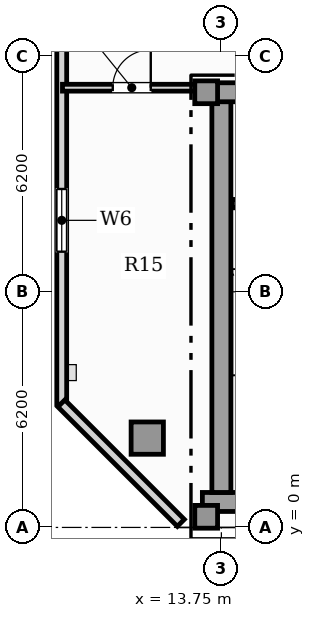
"""IFC4 building model, lengths in metres.
Left out: names, types, materials, properties, quantities, classifications, styles, units other than length and angle.
Written with IfcOpenShell. Run it as: python <this file> out.ifc"""

import sys

from ifc_helpers import new_model, si_unit, direction, frame, frame_2d, origin, origin_2d, place, context, subcontext, project, spatial, rectangle, hollow_rectangle, extrude, element, fill, save


model = new_model("IFC4")
c1 = context("Model", 3, precision=1e-05, world=origin(), true_north=direction((0.0, 1.0)))
c2 = subcontext(c1, "Body", "Model", "MODEL_VIEW")
j1 = project(units=[si_unit("LENGTHUNIT", "METRE"), si_unit("PLANEANGLEUNIT", "RADIAN")], contexts=[c1])
p1 = place(None, origin())
s1 = spatial("IfcSite", under=j1, at=p1, CompositionType="ELEMENT")
p2 = place(p1, origin())
s2 = spatial("IfcBuilding", under=s1, at=p2, CompositionType="ELEMENT")
p3 = place(p2, frame((0.0, 0.0, 341.35)))
s3 = spatial("IfcBuildingStorey", under=s2, at=p3, CompositionType="ELEMENT", Elevation=341.35)
p4 = place(p3, frame((13.25, 0.67, 0.0), z_axis=(0.0, 0.0, 1.0), x_axis=(1.0, 0.0, 0.0)))
e1 = element("IfcWall", 1, at=p4, inside=s3, PredefinedType="SHEAR", context=c2, shape_type="SweptSolid", body=[
    extrude(rectangle(XDim=31.0, YDim=0.5, at=frame_2d((15.5, 0.0))), origin(), (0.0, 0.0, 1.0), 3.63),
])
p5 = place(p3, frame((13.75, 0.92, 0.0), z_axis=(0.0, 0.0, 1.0), x_axis=(0.0, 1.0, 0.0)))
e2 = element("IfcWall", 2, at=p5, inside=s3, PredefinedType="SHEAR", context=c2, shape_type="SweptSolid", body=[
    extrude(rectangle(XDim=10.53, YDim=0.5, at=frame_2d((5.265, 0.0))), origin(), (0.0, 0.0, 1.0), 3.63),
])
p6 = place(p3, frame((13.25, 11.45, 0.0), z_axis=(0.0, 0.0, 1.0), x_axis=(1.0, 0.0, 0.0)))
e3 = element("IfcWall", 3, at=p6, inside=s3, PredefinedType="SHEAR", context=c2, shape_type="SweptSolid", body=[
    extrude(rectangle(XDim=2.95, YDim=0.5, at=frame_2d((1.475, 0.0))), origin(), (0.0, 0.0, 1.0), 3.63),
])
for number, where, z_axis, x_axis in (
    (4, (13.35, 0.28, 0.0), (0.0, 0.0, 1.0), (1.0, 0.0, 0.0)),
    (5, (13.35, 11.45, 0.0), (0.0, 0.0, 1.0), (1.0, 0.0, 0.0)),
):
    element("IfcColumn", number, at=place(p3, frame(where, z_axis=z_axis, x_axis=x_axis)), inside=s3, PredefinedType="COLUMN", context=c2, shape_type="SweptSolid", body=[
        extrude(rectangle(XDim=0.6, YDim=0.6, at=origin_2d()), origin(), (0.0, 0.0, 1.0), 3.85),
    ])
p7 = place(p3, frame((11.8, 2.35, 0.0), z_axis=(0.0, 0.0, 1.0), x_axis=(1.0, 0.0, 0.0)))
e6 = element("IfcColumn", 6, at=p7, inside=s3, PredefinedType="USERDEFINED", context=c2, shape_type="SweptSolid", body=[
    extrude(hollow_rectangle(XDim=0.85, YDim=0.85, WallThickness=0.05, at=origin_2d()), origin(), (0.0, 0.0, 1.0), 3.85),
])
p8 = place(p3, frame((9.55, 28.408, 0.0), z_axis=(0.0, 0.0, 1.0), x_axis=(0.0, -1.0, 0.0)))
e7 = element("IfcWall", 7, at=p8, inside=s3, PredefinedType="SOLIDWALL", context=c2, shape_type="SweptSolid", body=[
    extrude(rectangle(XDim=25.168, YDim=0.26, at=frame_2d((12.584, 0.0))), origin(), (0.0, 0.0, 1.0), 3.63),
])
p9 = place(p8, frame((19.503, 0.0, 0.88)))
e8 = element("IfcOpeningElement", 8, at=p9, cuts=e7, PredefinedType="OPENING", context=c2, shape_type="SweptSolid", body=[
    extrude(rectangle(XDim=1.65, YDim=2.0, at=frame_2d((0.825, 1.0))), frame((0.0, 0.14, 0.0), z_axis=(0.0, -1.0, 0.0), x_axis=(1.0, 0.0, 0.0)), (0.0, 0.0, 1.0), 0.28),
])
p10 = place(p8, frame((2.77, 0.0, 0.95)))
e9 = element("IfcOpeningElement", 9, at=p10, cuts=e7, PredefinedType="OPENING", context=c2, shape_type="SweptSolid", body=[
    extrude(rectangle(XDim=0.9, YDim=1.5, at=frame_2d((0.45, 0.75))), frame((0.0, 0.14, 0.0), z_axis=(0.0, -1.0, 0.0), x_axis=(1.0, 0.0, 0.0)), (0.0, 0.0, 1.0), 0.28),
])
p11 = place(p8, frame((11.274, 0.0, 0.88)))
e10 = element("IfcOpeningElement", 10, at=p11, cuts=e7, PredefinedType="OPENING", context=c2, shape_type="SweptSolid", body=[
    extrude(rectangle(XDim=1.65, YDim=2.0, at=frame_2d((0.825, 1.0))), frame((0.0, 0.14, 0.0), z_axis=(0.0, -1.0, 0.0), x_axis=(1.0, 0.0, 0.0)), (0.0, 0.0, 1.0), 0.28),
])
p12 = place(p8, frame((8.044, 0.0, 0.88)))
e11 = element("IfcOpeningElement", 11, at=p12, cuts=e7, PredefinedType="OPENING", context=c2, shape_type="SweptSolid", body=[
    extrude(rectangle(XDim=1.65, YDim=2.0, at=frame_2d((0.825, 1.0))), frame((0.0, 0.14, 0.0), z_axis=(0.0, -1.0, 0.0), x_axis=(1.0, 0.0, 0.0)), (0.0, 0.0, 1.0), 0.28),
])
p13 = place(p8, frame((4.815, 0.0, 0.88)))
e12 = element("IfcOpeningElement", 12, at=p13, cuts=e7, PredefinedType="OPENING", context=c2, shape_type="SweptSolid", body=[
    extrude(rectangle(XDim=1.65, YDim=2.0, at=frame_2d((0.825, 1.0))), frame((0.0, 0.14, 0.0), z_axis=(0.0, -1.0, 0.0), x_axis=(1.0, 0.0, 0.0)), (0.0, 0.0, 1.0), 0.28),
])
p14 = place(p3, frame((9.54, 3.264, 0.0), z_axis=(0.0, 0.0, 1.0), x_axis=(0.707079321262, -0.707134240044, 0.0)))
e13 = element("IfcWall", 13, at=p14, inside=s3, PredefinedType="SOLIDWALL", context=c2, shape_type="SweptSolid", body=[
    extrude(rectangle(XDim=4.446, YDim=0.26, at=frame_2d((2.223, 0.0))), origin(), (0.0, 0.0, 1.0), 3.63),
])
p15 = place(p3, frame((14.04, 8.52, 0.0), z_axis=(0.0, 0.0, 1.0), x_axis=(1.0, 0.0, 0.0)))
e14 = element("IfcWall", 14, at=p15, inside=s3, PredefinedType="SOLIDWALL", context=c2, shape_type="SweptSolid", body=[
    extrude(rectangle(XDim=3.4, YDim=0.22, at=frame_2d((1.7, 0.0))), origin(), (0.0, 0.0, 1.0), 3.63),
])
p16 = place(p15, frame((1.125, 0.0, 0.0)))
e15 = element("IfcOpeningElement", 15, at=p16, cuts=e14, PredefinedType="OPENING", context=c2, shape_type="SweptSolid", body=[
    extrude(rectangle(XDim=1.15, YDim=2.2, at=frame_2d((0.575, 1.1))), frame((0.0, 0.12, 0.0), z_axis=(0.0, -1.0, 0.0), x_axis=(1.0, 0.0, 0.0)), (0.0, 0.0, 1.0), 0.24),
])
p17 = place(p3, frame((9.569, 11.57, 0.0), z_axis=(0.0, 0.0, 1.0), x_axis=(1.0, 0.0, 0.0)))
e16 = element("IfcWall", 16, at=p17, inside=s3, PredefinedType="PARTITIONING", context=c2, shape_type="SweptSolid", body=[
    extrude(rectangle(XDim=3.646, YDim=0.18, at=frame_2d((1.823, 0.0))), origin(), (0.0, 0.0, 1.0), 3.63),
])
p18 = place(p17, frame((1.323, 0.0, 0.0)))
e17 = element("IfcOpeningElement", 17, at=p18, cuts=e16, PredefinedType="OPENING", context=c2, shape_type="SweptSolid", body=[
    extrude(rectangle(XDim=1.0, YDim=2.15, at=frame_2d((0.5, 1.075))), frame((0.0, 0.1, 0.0), z_axis=(0.0, -1.0, 0.0), x_axis=(1.0, 0.0, 0.0)), (0.0, 0.0, 1.0), 0.2),
])
p19 = place(p9, origin())
e18 = element("IfcWindow", 18, at=p19, inside=s3, PartitioningType="SINGLE_PANEL", PredefinedType="WINDOW", context=c2, shape_type="SweptSolid", body=[
    extrude(rectangle(XDim=1.65, YDim=2.0, at=frame_2d((0.825, 1.0))), frame((0.0, 0.03, 0.0), z_axis=(0.0, -1.0, 0.0), x_axis=(1.0, 0.0, 0.0)), (0.0, 0.0, 1.0), 0.06),
])
fill(e8, e18)
p20 = place(p18, origin())
e19 = element("IfcDoor", 19, at=p20, inside=s3, OperationType="SINGLE_SWING_RIGHT", PredefinedType="DOOR", context=c2, shape_type="SweptSolid", body=[
    extrude(rectangle(XDim=1.0, YDim=2.15, at=frame_2d((0.5, 1.075))), frame((0.0, 0.025, 0.0), z_axis=(0.0, -1.0, 0.0), x_axis=(1.0, 0.0, 0.0)), (0.0, 0.0, 1.0), 0.05),
])
fill(e17, e19)
save(model, sys.argv[1])
